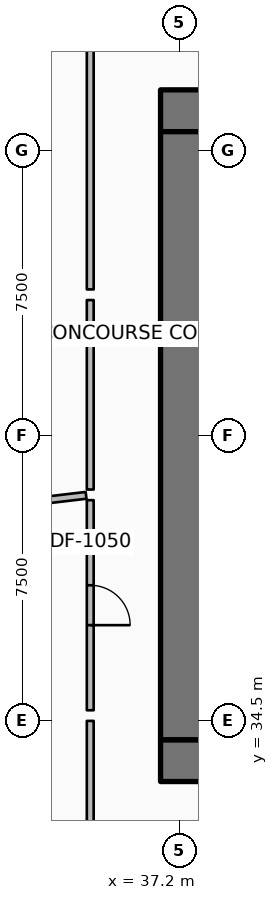
"""IFC4 building model, lengths in metres.
Left out: names, types, materials, properties, quantities, classifications, styles, units other than length and angle.
Written with IfcOpenShell. Run it as: python <this file> out.ifc"""

import sys

from ifc_helpers import new_model, si_unit, direction, frame, frame_2d, origin, place, context, subcontext, project, spatial, rectangle, extrude, element, fill, save


model = new_model("IFC4")
c1 = context("Model", 3, precision=1e-05, world=origin(), true_north=direction((0.0, 1.0)))
c2 = subcontext(c1, "Body", "Model", "MODEL_VIEW")
j1 = project(units=[si_unit("LENGTHUNIT", "METRE"), si_unit("PLANEANGLEUNIT", "RADIAN")], contexts=[c1])
p1 = place(None, origin())
s1 = spatial("IfcSite", under=j1, at=p1, CompositionType="ELEMENT")
p2 = place(p1, origin())
s2 = spatial("IfcBuilding", under=s1, at=p2, CompositionType="ELEMENT")
p3 = place(p2, frame((0.0, 0.0, 12.0)))
s3 = spatial("IfcBuildingStorey", under=s2, at=p3, CompositionType="ELEMENT", Elevation=12.0)
for number, where, z_axis, x_axis in (
    (1, (36.7, 33.45, 0.0), (0.0, 0.0, 1.0), (1.0, 0.0, 0.0)),
    (2, (36.7, 50.55, 0.0), (0.0, 0.0, 1.0), (1.0, 0.0, 0.0)),
):
    element("IfcWall", number, at=place(p3, frame(where, z_axis=z_axis, x_axis=x_axis)), inside=s3, PredefinedType="SHEAR", context=c2, shape_type="SweptSolid", body=[
        extrude(rectangle(XDim=10.2, YDim=1.1, at=frame_2d((5.1, 0.0))), origin(), (0.0, 0.0, 1.0), 4.8),
    ])
p4 = place(p3, frame((37.25, 34.0, 0.0), z_axis=(0.0, 0.0, 1.0), x_axis=(0.0, 1.0, 0.0)))
e3 = element("IfcWall", 3, at=p4, inside=s3, PredefinedType="SHEAR", context=c2, shape_type="SweptSolid", body=[
    extrude(rectangle(XDim=16.0, YDim=1.1, at=frame_2d((8.0, 0.0))), origin(), (0.0, 0.0, 1.0), 4.8),
])
p5 = place(p3, frame((34.85, 52.227, 0.0), z_axis=(0.0, 0.0, 1.0), x_axis=(0.0, -1.0, 0.0)))
e4 = element("IfcWall", 4, at=p5, inside=s3, PredefinedType="PARTITIONING", context=c2, shape_type="SweptSolid", body=[
    extrude(rectangle(XDim=6.378, YDim=0.18, at=frame_2d((3.189, 0.0))), origin(), (0.0, 0.0, 1.0), 3.693),
])
p6 = place(p3, frame((34.85, 45.569, 0.0), z_axis=(0.0, 0.0, 1.0), x_axis=(0.0, -1.0, 0.0)))
e5 = element("IfcWall", 5, at=p6, inside=s3, PredefinedType="PARTITIONING", context=c2, shape_type="SweptSolid", body=[
    extrude(rectangle(XDim=4.985, YDim=0.18, at=frame_2d((2.493, 0.0))), origin(), (0.0, 0.0, 1.0), 3.693),
])
p7 = place(p3, frame((34.741, 40.431, 0.0), z_axis=(0.0, 0.0, 1.0), x_axis=(-0.993068662125, -0.117535663975, 0.0)))
e6 = element("IfcWall", 6, at=p7, inside=s3, PredefinedType="PARTITIONING", context=c2, shape_type="SweptSolid", body=[
    extrude(rectangle(XDim=21.989, YDim=0.18, at=frame_2d((10.994, 0.0))), origin(), (0.0, 0.0, 1.0), 3.693),
])
p8 = place(p3, frame((34.85, 40.304, 0.0), z_axis=(0.0, 0.0, 1.0), x_axis=(0.0, -1.0, 0.0)))
e7 = element("IfcWall", 7, at=p8, inside=s3, PredefinedType="PARTITIONING", context=c2, shape_type="SweptSolid", body=[
    extrude(rectangle(XDim=5.528, YDim=0.18, at=frame_2d((2.764, 0.0))), origin(), (0.0, 0.0, 1.0), 3.693),
])
p9 = place(p8, frame((2.239, 0.0, 0.0)))
e8 = element("IfcOpeningElement", 8, at=p9, cuts=e7, PredefinedType="OPENING", context=c2, shape_type="SweptSolid", body=[
    extrude(rectangle(XDim=1.05, YDim=2.1, at=frame_2d((0.525, 1.05))), frame((0.0, 0.1, 0.0), z_axis=(0.0, -1.0, 0.0), x_axis=(1.0, 0.0, 0.0)), (0.0, 0.0, 1.0), 0.2),
])
p10 = place(p3, frame((34.85, 34.496, 0.0), z_axis=(0.0, 0.0, 1.0), x_axis=(0.0, -1.0, 0.0)))
e9 = element("IfcWall", 9, at=p10, inside=s3, PredefinedType="PARTITIONING", context=c2, shape_type="SweptSolid", body=[
    extrude(rectangle(XDim=3.306, YDim=0.18, at=frame_2d((1.653, 0.0))), origin(), (0.0, 0.0, 1.0), 3.693),
])
p11 = place(p9, origin())
e10 = element("IfcDoor", 10, at=p11, inside=s3, OperationType="SINGLE_SWING_RIGHT", PredefinedType="DOOR", context=c2, shape_type="SweptSolid", body=[
    extrude(rectangle(XDim=1.05, YDim=2.1, at=frame_2d((0.525, 1.05))), frame((0.0, 0.025, 0.0), z_axis=(0.0, -1.0, 0.0), x_axis=(1.0, 0.0, 0.0)), (0.0, 0.0, 1.0), 0.05),
])
fill(e8, e10)
save(model, sys.argv[1])
